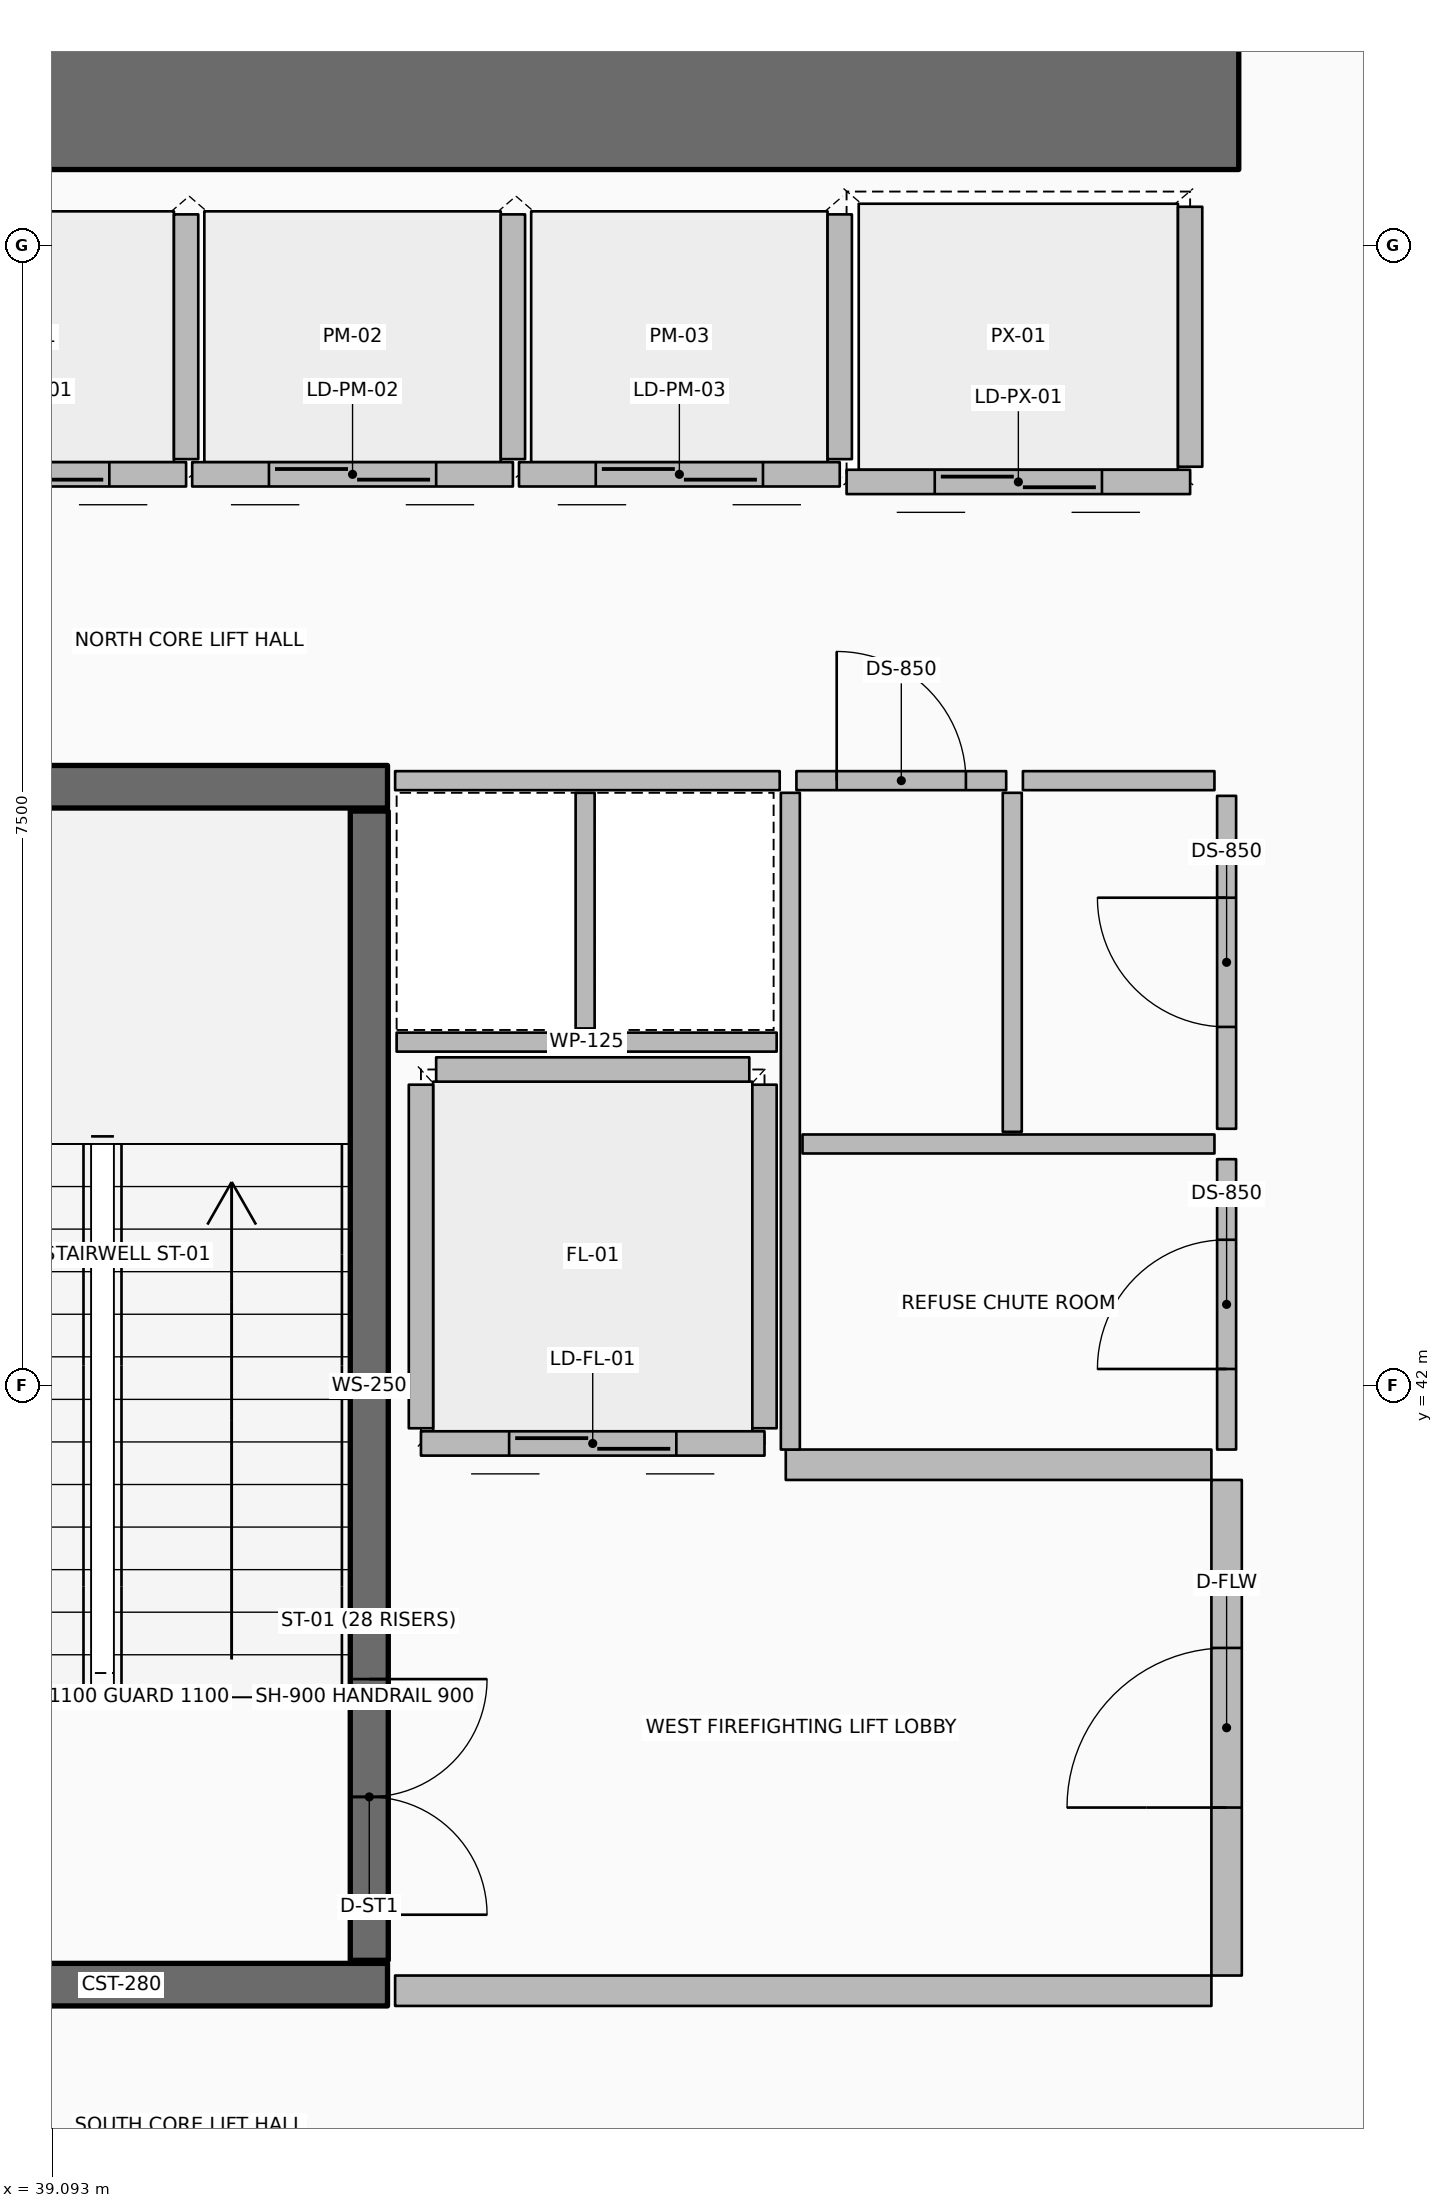
"""IFC4 building model, lengths in metres.
Left out: names, types, materials, properties, quantities, classifications, styles, units other than length and angle.
Written with IfcOpenShell. Run it as: python <this file> out.ifc"""

import sys

from ifc_helpers import new_model, si_unit, direction, frame, frame_2d, origin, origin_2d, place, context, subcontext, project, spatial, rectangle, hollow_rectangle, extrude, element, fill, save


model = new_model("IFC4")
c1 = context("Model", 3, precision=1e-05, world=origin(), true_north=direction((0.0, 1.0)))
c2 = subcontext(c1, "Body", "Model", "MODEL_VIEW")
j1 = project(units=[si_unit("LENGTHUNIT", "METRE"), si_unit("PLANEANGLEUNIT", "RADIAN")], contexts=[c1])
p1 = place(None, origin())
s1 = spatial("IfcSite", under=j1, at=p1, CompositionType="ELEMENT")
p2 = place(p1, origin())
s2 = spatial("IfcBuilding", under=s1, at=p2, CompositionType="ELEMENT")
p3 = place(p2, frame((0.0, 0.0, 123.0)))
s3 = spatial("IfcBuildingStorey", under=s2, at=p3, CompositionType="ELEMENT", Elevation=123.0)
p4 = place(p3, frame((37.0, 50.4, 0.0), z_axis=(0.0, 0.0, 1.0), x_axis=(1.0, 0.0, 0.0)))
e1 = element("IfcWall", 1, at=p4, inside=s3, PredefinedType="SHEAR", context=c2, shape_type="SweptSolid", body=[
    extrude(rectangle(XDim=9.9, YDim=0.8, at=frame_2d((4.95, 0.0))), origin(), (0.0, 0.0, 1.0), 4.8),
])
for number, where, z_axis, x_axis in (
    (2, (37.8, 38.06, 0.0), (0.0, 0.0, 1.0), (1.0, 0.0, 0.0)),
    (3, (37.8, 45.94, 0.0), (0.0, 0.0, 1.0), (1.0, 0.0, 0.0)),
):
    element("IfcWall", number, at=place(p3, frame(where, z_axis=z_axis, x_axis=x_axis)), inside=s3, PredefinedType="SHEAR", context=c2, shape_type="SweptSolid", body=[
        extrude(rectangle(XDim=3.5, YDim=0.28, at=frame_2d((1.75, 0.0))), origin(), (0.0, 0.0, 1.0), 4.8),
    ])
p5 = place(p3, frame((41.18, 43.59, 0.0), z_axis=(0.0, 0.0, 1.0), x_axis=(1.0, 0.0, 0.0)))
e4 = element("IfcColumn", 4, at=p5, inside=s3, PredefinedType="COLUMN", context=c2, shape_type="SweptSolid", body=[
    extrude(hollow_rectangle(XDim=0.2, YDim=0.2, WallThickness=0.01, InnerFilletRadius=0.01, OuterFilletRadius=0.02, at=origin_2d()), origin(), (0.0, 0.0, 1.0), 2.195),
])
p6 = place(p3, frame((41.18, 38.22, 0.0), z_axis=(0.0, 0.0, 1.0), x_axis=(0.0, 1.0, 0.0)))
e5 = element("IfcWall", 5, at=p6, inside=s3, PredefinedType="SOLIDWALL", context=c2, shape_type="SweptSolid", body=[
    extrude(rectangle(XDim=7.56, YDim=0.25, at=frame_2d((3.78, 0.0))), origin(), (0.0, 0.0, 1.0), 4.4),
])
p7 = place(p6, frame((0.3, 0.0, 0.0)))
e6 = element("IfcOpeningElement", 6, at=p7, cuts=e5, PredefinedType="OPENING", context=c2, shape_type="SweptSolid", body=[
    extrude(rectangle(XDim=1.55, YDim=2.15, at=frame_2d((0.775, 1.075))), frame((0.0, 0.135, 0.0), z_axis=(0.0, -1.0, 0.0), x_axis=(1.0, 0.0, 0.0)), (0.0, 0.0, 1.0), 0.27),
])
p8 = place(p3, frame((39.975, 47.995, 0.0), z_axis=(0.0, 0.0, 1.0), x_axis=(-1.0, 0.0, 0.0)))
e7 = element("IfcWall", 7, at=p8, inside=s3, PredefinedType="PARTITIONING", context=c2, shape_type="SweptSolid", body=[
    extrude(rectangle(XDim=2.11, YDim=0.16, at=frame_2d((1.055, 0.0))), origin(), (0.0, 0.0, 1.0), 4.4),
])
p9 = place(p8, frame((0.505, 0.0, 0.0)))
e8 = element("IfcOpeningElement", 8, at=p9, cuts=e7, PredefinedType="OPENING", context=c2, shape_type="SweptSolid", body=[
    extrude(rectangle(XDim=1.1, YDim=2.1, at=frame_2d((0.55, 1.05))), frame((0.0, 0.09, 0.0), z_axis=(0.0, -1.0, 0.0), x_axis=(1.0, 0.0, 0.0)), (0.0, 0.0, 1.0), 0.18),
])
p10 = place(p3, frame((39.975, 48.095, 0.0), z_axis=(0.0, 0.0, 1.0), x_axis=(0.0, 1.0, 0.0)))
e9 = element("IfcWall", 9, at=p10, inside=s3, PredefinedType="PARTITIONING", context=c2, shape_type="SweptSolid", body=[
    extrude(rectangle(XDim=1.61, YDim=0.16, at=frame_2d((0.805, 0.0))), origin(), (0.0, 0.0, 1.0), 4.4),
])
p11 = place(p3, frame((42.125, 47.995, 0.0), z_axis=(0.0, 0.0, 1.0), x_axis=(-1.0, 0.0, 0.0)))
e10 = element("IfcWall", 10, at=p11, inside=s3, PredefinedType="PARTITIONING", context=c2, shape_type="SweptSolid", body=[
    extrude(rectangle(XDim=2.11, YDim=0.16, at=frame_2d((1.055, 0.0))), origin(), (0.0, 0.0, 1.0), 4.4),
])
p12 = place(p11, frame((0.505, 0.0, 0.0)))
e11 = element("IfcOpeningElement", 11, at=p12, cuts=e10, PredefinedType="OPENING", context=c2, shape_type="SweptSolid", body=[
    extrude(rectangle(XDim=1.1, YDim=2.1, at=frame_2d((0.55, 1.05))), frame((0.0, 0.09, 0.0), z_axis=(0.0, -1.0, 0.0), x_axis=(1.0, 0.0, 0.0)), (0.0, 0.0, 1.0), 0.18),
])
p13 = place(p3, frame((42.125, 48.095, 0.0), z_axis=(0.0, 0.0, 1.0), x_axis=(0.0, 1.0, 0.0)))
e12 = element("IfcWall", 12, at=p13, inside=s3, PredefinedType="PARTITIONING", context=c2, shape_type="SweptSolid", body=[
    extrude(rectangle(XDim=1.61, YDim=0.16, at=frame_2d((0.805, 0.0))), origin(), (0.0, 0.0, 1.0), 4.4),
])
p14 = place(p3, frame((44.275, 47.995, 0.0), z_axis=(0.0, 0.0, 1.0), x_axis=(-1.0, 0.0, 0.0)))
e13 = element("IfcWall", 13, at=p14, inside=s3, PredefinedType="PARTITIONING", context=c2, shape_type="SweptSolid", body=[
    extrude(rectangle(XDim=2.11, YDim=0.16, at=frame_2d((1.055, 0.0))), origin(), (0.0, 0.0, 1.0), 4.4),
])
p15 = place(p14, frame((0.505, 0.0, 0.0)))
e14 = element("IfcOpeningElement", 14, at=p15, cuts=e13, PredefinedType="OPENING", context=c2, shape_type="SweptSolid", body=[
    extrude(rectangle(XDim=1.1, YDim=2.1, at=frame_2d((0.55, 1.05))), frame((0.0, 0.09, 0.0), z_axis=(0.0, -1.0, 0.0), x_axis=(1.0, 0.0, 0.0)), (0.0, 0.0, 1.0), 0.18),
])
p16 = place(p3, frame((44.275, 48.095, 0.0), z_axis=(0.0, 0.0, 1.0), x_axis=(0.0, 1.0, 0.0)))
e15 = element("IfcWall", 15, at=p16, inside=s3, PredefinedType="PARTITIONING", context=c2, shape_type="SweptSolid", body=[
    extrude(rectangle(XDim=1.61, YDim=0.16, at=frame_2d((0.805, 0.0))), origin(), (0.0, 0.0, 1.0), 4.4),
])
p17 = place(p3, frame((46.58, 47.945, 0.0), z_axis=(0.0, 0.0, 1.0), x_axis=(-1.0, 0.0, 0.0)))
e16 = element("IfcWall", 16, at=p17, inside=s3, PredefinedType="PARTITIONING", context=c2, shape_type="SweptSolid", body=[
    extrude(rectangle(XDim=2.26, YDim=0.16, at=frame_2d((1.13, 0.0))), origin(), (0.0, 0.0, 1.0), 4.4),
])
p18 = place(p17, frame((0.58, 0.0, 0.0)))
e17 = element("IfcOpeningElement", 17, at=p18, cuts=e16, PredefinedType="OPENING", context=c2, shape_type="SweptSolid", body=[
    extrude(rectangle(XDim=1.1, YDim=2.1, at=frame_2d((0.55, 1.05))), frame((0.0, 0.09, 0.0), z_axis=(0.0, -1.0, 0.0), x_axis=(1.0, 0.0, 0.0)), (0.0, 0.0, 1.0), 0.18),
])
p19 = place(p3, frame((46.58, 48.045, 0.0), z_axis=(0.0, 0.0, 1.0), x_axis=(0.0, 1.0, 0.0)))
e18 = element("IfcWall", 18, at=p19, inside=s3, PredefinedType="PARTITIONING", context=c2, shape_type="SweptSolid", body=[
    extrude(rectangle(XDim=1.71, YDim=0.16, at=frame_2d((0.855, 0.0))), origin(), (0.0, 0.0, 1.0), 4.4),
])
p20 = place(p3, frame((43.78, 41.62, 0.0), z_axis=(0.0, 0.0, 1.0), x_axis=(-1.0, 0.0, 0.0)))
e19 = element("IfcWall", 19, at=p20, inside=s3, PredefinedType="PARTITIONING", context=c2, shape_type="SweptSolid", body=[
    extrude(rectangle(XDim=2.26, YDim=0.16, at=frame_2d((1.13, 0.0))), origin(), (0.0, 0.0, 1.0), 4.4),
])
p21 = place(p20, frame((0.58, 0.0, 0.0)))
e20 = element("IfcOpeningElement", 20, at=p21, cuts=e19, PredefinedType="OPENING", context=c2, shape_type="SweptSolid", body=[
    extrude(rectangle(XDim=1.1, YDim=2.1, at=frame_2d((0.55, 1.05))), frame((0.0, 0.09, 0.0), z_axis=(0.0, -1.0, 0.0), x_axis=(1.0, 0.0, 0.0)), (0.0, 0.0, 1.0), 0.18),
])
for number, where, z_axis, x_axis in (
    (21, (43.78, 41.72, 0.0), (0.0, 0.0, 1.0), (0.0, 1.0, 0.0)),
    (22, (41.52, 41.72, 0.0), (0.0, 0.0, 1.0), (0.0, 1.0, 0.0)),
):
    element("IfcWall", number, at=place(p3, frame(where, z_axis=z_axis, x_axis=x_axis)), inside=s3, PredefinedType="PARTITIONING", context=c2, shape_type="SweptSolid", body=[
        extrude(rectangle(XDim=2.26, YDim=0.16, at=frame_2d((1.13, 0.0))), origin(), (0.0, 0.0, 1.0), 4.4),
    ])
p22 = place(p3, frame((41.62, 44.08, 0.0), z_axis=(0.0, 0.0, 1.0), x_axis=(1.0, 0.0, 0.0)))
e23 = element("IfcWall", 23, at=p22, inside=s3, PredefinedType="PARTITIONING", context=c2, shape_type="SweptSolid", body=[
    extrude(rectangle(XDim=2.06, YDim=0.16, at=frame_2d((1.03, 0.0))), origin(), (0.0, 0.0, 1.0), 4.4),
])
p23 = place(p3, frame((41.35, 38.02, 0.0), z_axis=(0.0, 0.0, 1.0), x_axis=(1.0, 0.0, 0.0)))
e24 = element("IfcWall", 24, at=p23, inside=s3, PredefinedType="PARTITIONING", context=c2, shape_type="SweptSolid", body=[
    extrude(rectangle(XDim=5.37, YDim=0.2, at=frame_2d((2.685, 0.0))), origin(), (0.0, 0.0, 1.0), 4.4),
])
p24 = place(p3, frame((43.92, 41.48, 0.0), z_axis=(0.0, 0.0, 1.0), x_axis=(1.0, 0.0, 0.0)))
e25 = element("IfcWall", 25, at=p24, inside=s3, PredefinedType="PARTITIONING", context=c2, shape_type="SweptSolid", body=[
    extrude(rectangle(XDim=2.8, YDim=0.2, at=frame_2d((1.4, 0.0))), origin(), (0.0, 0.0, 1.0), 4.4),
])
p25 = place(p3, frame((46.82, 38.12, 0.0), z_axis=(0.0, 0.0, 1.0), x_axis=(0.0, 1.0, 0.0)))
e26 = element("IfcWall", 26, at=p25, inside=s3, PredefinedType="PARTITIONING", context=c2, shape_type="SweptSolid", body=[
    extrude(rectangle(XDim=3.26, YDim=0.2, at=frame_2d((1.63, 0.0))), origin(), (0.0, 0.0, 1.0), 4.4),
])
p26 = place(p25, frame((1.105, 0.0, 0.0)))
e27 = element("IfcOpeningElement", 27, at=p26, cuts=e26, PredefinedType="OPENING", context=c2, shape_type="SweptSolid", body=[
    extrude(rectangle(XDim=1.05, YDim=2.1, at=frame_2d((0.525, 1.05))), frame((0.0, 0.11, 0.0), z_axis=(0.0, -1.0, 0.0), x_axis=(1.0, 0.0, 0.0)), (0.0, 0.0, 1.0), 0.22),
])
p27 = place(p3, frame((41.36, 44.26, 0.0), z_axis=(0.0, 0.0, 1.0), x_axis=(1.0, 0.0, 0.0)))
e28 = element("IfcWall", 28, at=p27, inside=s3, PredefinedType="PARTITIONING", context=c2, shape_type="SweptSolid", body=[
    extrude(rectangle(XDim=2.5, YDim=0.125, at=frame_2d((1.25, 0.0))), origin(), (0.0, 0.0, 1.0), 3.84),
])
p28 = place(p3, frame((42.6, 44.35, 0.0), z_axis=(0.0, 0.0, 1.0), x_axis=(0.0, 1.0, 0.0)))
e29 = element("IfcWall", 29, at=p28, inside=s3, PredefinedType="PARTITIONING", context=c2, shape_type="SweptSolid", body=[
    extrude(rectangle(XDim=1.55, YDim=0.125, at=frame_2d((0.775, 0.0))), origin(), (0.0, 0.0, 1.0), 3.84),
])
p29 = place(p3, frame((43.95, 41.58, 0.0), z_axis=(0.0, 0.0, 1.0), x_axis=(0.0, 1.0, 0.0)))
e30 = element("IfcWall", 30, at=p29, inside=s3, PredefinedType="PARTITIONING", context=c2, shape_type="SweptSolid", body=[
    extrude(rectangle(XDim=4.32, YDim=0.125, at=frame_2d((2.16, 0.0))), origin(), (0.0, 0.0, 1.0), 3.84),
])
p30 = place(p3, frame((44.03, 43.59, 0.0), z_axis=(0.0, 0.0, 1.0), x_axis=(1.0, 0.0, 0.0)))
e31 = element("IfcWall", 31, at=p30, inside=s3, PredefinedType="PARTITIONING", context=c2, shape_type="SweptSolid", body=[
    extrude(rectangle(XDim=2.71, YDim=0.125, at=frame_2d((1.355, 0.0))), origin(), (0.0, 0.0, 1.0), 3.84),
])
p31 = place(p3, frame((45.41, 43.67, 0.0), z_axis=(0.0, 0.0, 1.0), x_axis=(0.0, 1.0, 0.0)))
e32 = element("IfcWall", 32, at=p31, inside=s3, PredefinedType="PARTITIONING", context=c2, shape_type="SweptSolid", body=[
    extrude(rectangle(XDim=2.23, YDim=0.125, at=frame_2d((1.115, 0.0))), origin(), (0.0, 0.0, 1.0), 3.84),
])
p32 = place(p3, frame((46.82, 41.58, 0.0), z_axis=(0.0, 0.0, 1.0), x_axis=(0.0, 1.0, 0.0)))
e33 = element("IfcWall", 33, at=p32, inside=s3, PredefinedType="PARTITIONING", context=c2, shape_type="SweptSolid", body=[
    extrude(rectangle(XDim=1.91, YDim=0.125, at=frame_2d((0.955, 0.0))), origin(), (0.0, 0.0, 1.0), 3.84),
])
p33 = place(p32, frame((0.53, 0.0, 0.0)))
e34 = element("IfcOpeningElement", 34, at=p33, cuts=e33, PredefinedType="OPENING", context=c2, shape_type="SweptSolid", body=[
    extrude(rectangle(XDim=0.85, YDim=2.06, at=frame_2d((0.425, 1.03))), frame((0.0, 0.073, 0.0), z_axis=(0.0, -1.0, 0.0), x_axis=(1.0, 0.0, 0.0)), (0.0, 0.0, 1.0), 0.145),
])
p34 = place(p3, frame((46.82, 43.69, 0.0), z_axis=(0.0, 0.0, 1.0), x_axis=(0.0, 1.0, 0.0)))
e35 = element("IfcWall", 35, at=p34, inside=s3, PredefinedType="PARTITIONING", context=c2, shape_type="SweptSolid", body=[
    extrude(rectangle(XDim=2.19, YDim=0.125, at=frame_2d((1.095, 0.0))), origin(), (0.0, 0.0, 1.0), 3.84),
])
p35 = place(p34, frame((0.67, 0.0, 0.0)))
e36 = element("IfcOpeningElement", 36, at=p35, cuts=e35, PredefinedType="OPENING", context=c2, shape_type="SweptSolid", body=[
    extrude(rectangle(XDim=0.85, YDim=2.06, at=frame_2d((0.425, 1.03))), frame((0.0, 0.073, 0.0), z_axis=(0.0, -1.0, 0.0), x_axis=(1.0, 0.0, 0.0)), (0.0, 0.0, 1.0), 0.145),
])
p36 = place(p3, frame((41.35, 45.98, 0.0), z_axis=(0.0, 0.0, 1.0), x_axis=(1.0, 0.0, 0.0)))
e37 = element("IfcWall", 37, at=p36, inside=s3, PredefinedType="PARTITIONING", context=c2, shape_type="SweptSolid", body=[
    extrude(rectangle(XDim=2.53, YDim=0.125, at=frame_2d((1.265, 0.0))), origin(), (0.0, 0.0, 1.0), 3.84),
])
p37 = place(p3, frame((43.99, 45.98, 0.0), z_axis=(0.0, 0.0, 1.0), x_axis=(1.0, 0.0, 0.0)))
e38 = element("IfcWall", 38, at=p37, inside=s3, PredefinedType="PARTITIONING", context=c2, shape_type="SweptSolid", body=[
    extrude(rectangle(XDim=1.38, YDim=0.125, at=frame_2d((0.69, 0.0))), origin(), (0.0, 0.0, 1.0), 3.84),
])
p38 = place(p37, frame((0.265, 0.0, 0.0)))
e39 = element("IfcOpeningElement", 39, at=p38, cuts=e38, PredefinedType="OPENING", context=c2, shape_type="SweptSolid", body=[
    extrude(rectangle(XDim=0.85, YDim=2.06, at=frame_2d((0.425, 1.03))), frame((0.0, 0.073, 0.0), z_axis=(0.0, -1.0, 0.0), x_axis=(1.0, 0.0, 0.0)), (0.0, 0.0, 1.0), 0.145),
])
p39 = place(p3, frame((45.48, 45.98, 0.0), z_axis=(0.0, 0.0, 1.0), x_axis=(1.0, 0.0, 0.0)))
e40 = element("IfcWall", 40, at=p39, inside=s3, PredefinedType="PARTITIONING", context=c2, shape_type="SweptSolid", body=[
    extrude(rectangle(XDim=1.26, YDim=0.125, at=frame_2d((0.63, 0.0))), origin(), (0.0, 0.0, 1.0), 3.84),
])
p40 = place(p7, origin())
e41 = element("IfcDoor", 41, at=p40, inside=s3, OperationType="DOUBLE_DOOR_SINGLE_SWING", PredefinedType="DOOR", context=c2, shape_type="SweptSolid", body=[
    extrude(rectangle(XDim=1.55, YDim=2.15, at=frame_2d((0.775, 1.075))), frame((0.0, 0.025, 0.0), z_axis=(0.0, -1.0, 0.0), x_axis=(1.0, 0.0, 0.0)), (0.0, 0.0, 1.0), 0.05),
])
fill(e6, e41)
p41 = place(p9, origin())
e42 = element("IfcDoor", 42, at=p41, inside=s3, OperationType="DOUBLE_DOOR_SLIDING", PredefinedType="DOOR", context=c2, shape_type="SweptSolid", body=[
    extrude(rectangle(XDim=1.1, YDim=2.1, at=frame_2d((0.55, 1.05))), frame((0.0, 0.025, 0.0), z_axis=(0.0, -1.0, 0.0), x_axis=(1.0, 0.0, 0.0)), (0.0, 0.0, 1.0), 0.05),
])
fill(e8, e42)
p42 = place(p12, origin())
e43 = element("IfcDoor", 43, at=p42, inside=s3, OperationType="DOUBLE_DOOR_SLIDING", PredefinedType="DOOR", context=c2, shape_type="SweptSolid", body=[
    extrude(rectangle(XDim=1.1, YDim=2.1, at=frame_2d((0.55, 1.05))), frame((0.0, 0.025, 0.0), z_axis=(0.0, -1.0, 0.0), x_axis=(1.0, 0.0, 0.0)), (0.0, 0.0, 1.0), 0.05),
])
fill(e11, e43)
p43 = place(p15, origin())
e44 = element("IfcDoor", 44, at=p43, inside=s3, OperationType="DOUBLE_DOOR_SLIDING", PredefinedType="DOOR", context=c2, shape_type="SweptSolid", body=[
    extrude(rectangle(XDim=1.1, YDim=2.1, at=frame_2d((0.55, 1.05))), frame((0.0, 0.025, 0.0), z_axis=(0.0, -1.0, 0.0), x_axis=(1.0, 0.0, 0.0)), (0.0, 0.0, 1.0), 0.05),
])
fill(e14, e44)
p44 = place(p18, origin())
e45 = element("IfcDoor", 45, at=p44, inside=s3, OperationType="DOUBLE_DOOR_SLIDING", PredefinedType="DOOR", context=c2, shape_type="SweptSolid", body=[
    extrude(rectangle(XDim=1.1, YDim=2.1, at=frame_2d((0.55, 1.05))), frame((0.0, 0.025, 0.0), z_axis=(0.0, -1.0, 0.0), x_axis=(1.0, 0.0, 0.0)), (0.0, 0.0, 1.0), 0.05),
])
fill(e17, e45)
p45 = place(p21, origin())
e46 = element("IfcDoor", 46, at=p45, inside=s3, OperationType="DOUBLE_DOOR_SLIDING", PredefinedType="DOOR", context=c2, shape_type="SweptSolid", body=[
    extrude(rectangle(XDim=1.1, YDim=2.1, at=frame_2d((0.55, 1.05))), frame((0.0, 0.025, 0.0), z_axis=(0.0, -1.0, 0.0), x_axis=(1.0, 0.0, 0.0)), (0.0, 0.0, 1.0), 0.05),
])
fill(e20, e46)
p46 = place(p26, origin())
e47 = element("IfcDoor", 47, at=p46, inside=s3, OperationType="SINGLE_SWING_LEFT", PredefinedType="DOOR", context=c2, shape_type="SweptSolid", body=[
    extrude(rectangle(XDim=1.05, YDim=2.1, at=frame_2d((0.525, 1.05))), frame((0.0, 0.025, 0.0), z_axis=(0.0, -1.0, 0.0), x_axis=(1.0, 0.0, 0.0)), (0.0, 0.0, 1.0), 0.05),
])
fill(e27, e47)
p47 = place(p33, origin())
e48 = element("IfcDoor", 48, at=p47, inside=s3, OperationType="SINGLE_SWING_LEFT", PredefinedType="DOOR", context=c2, shape_type="SweptSolid", body=[
    extrude(rectangle(XDim=0.85, YDim=2.06, at=frame_2d((0.425, 1.03))), frame((0.0, 0.025, 0.0), z_axis=(0.0, -1.0, 0.0), x_axis=(1.0, 0.0, 0.0)), (0.0, 0.0, 1.0), 0.05),
])
fill(e34, e48)
p48 = place(p35, origin())
e49 = element("IfcDoor", 49, at=p48, inside=s3, OperationType="SINGLE_SWING_RIGHT", PredefinedType="DOOR", context=c2, shape_type="SweptSolid", body=[
    extrude(rectangle(XDim=0.85, YDim=2.06, at=frame_2d((0.425, 1.03))), frame((0.0, 0.025, 0.0), z_axis=(0.0, -1.0, 0.0), x_axis=(1.0, 0.0, 0.0)), (0.0, 0.0, 1.0), 0.05),
])
fill(e36, e49)
p49 = place(p38, origin())
e50 = element("IfcDoor", 50, at=p49, inside=s3, OperationType="SINGLE_SWING_LEFT", PredefinedType="DOOR", context=c2, shape_type="SweptSolid", body=[
    extrude(rectangle(XDim=0.85, YDim=2.06, at=frame_2d((0.425, 1.03))), frame((0.0, 0.025, 0.0), z_axis=(0.0, -1.0, 0.0), x_axis=(1.0, 0.0, 0.0)), (0.0, 0.0, 1.0), 0.05),
])
fill(e39, e50)
save(model, sys.argv[1])
